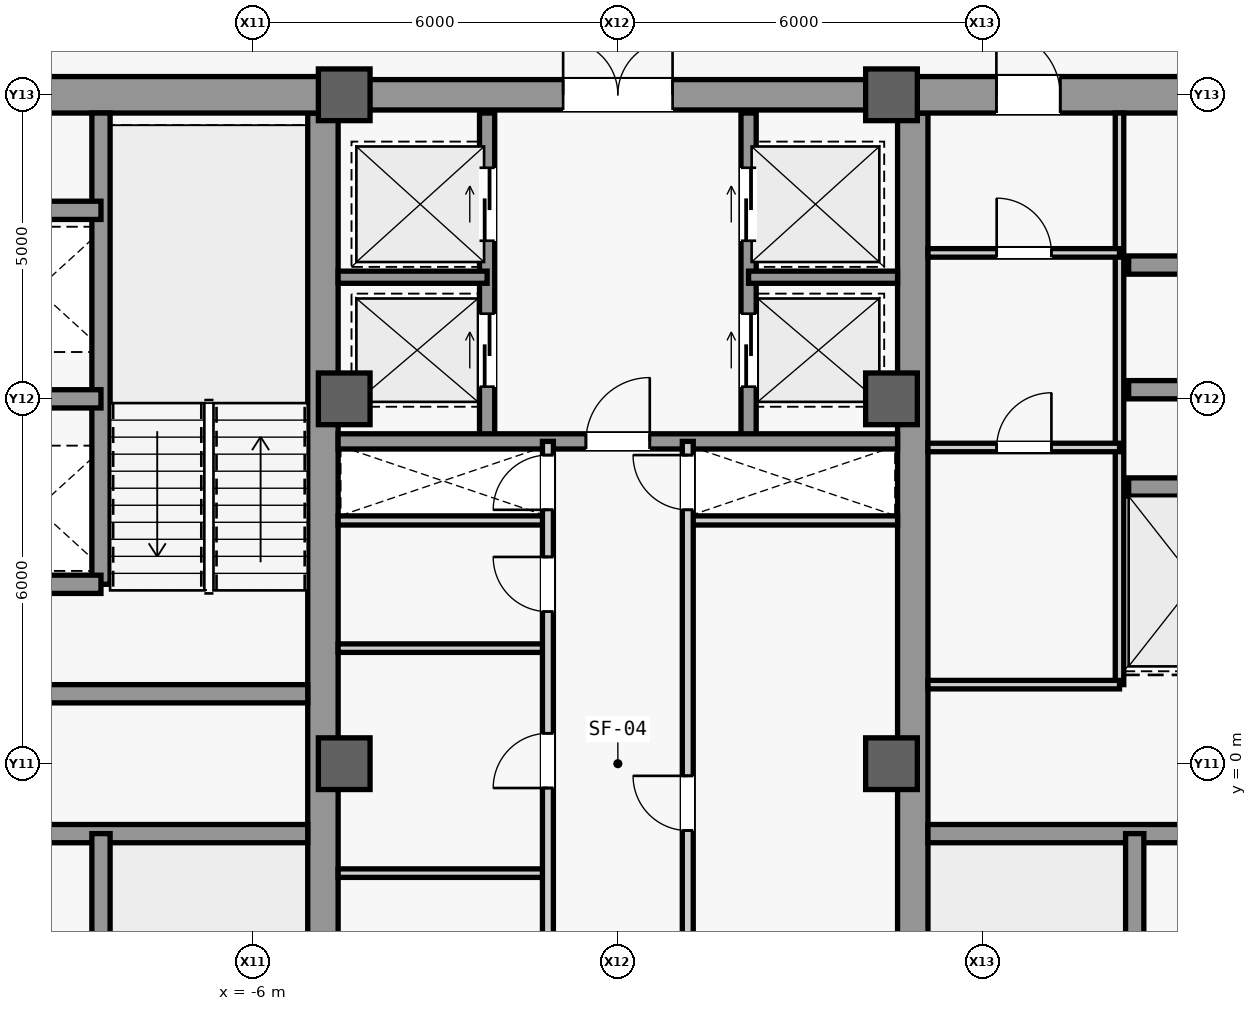
"""IFC4 building model, lengths in metres.
Left out: names, types, materials, properties, quantities, classifications, styles, units other than length and angle.
Written with IfcOpenShell. Run it as: python <this file> out.ifc"""

import sys

from ifc_helpers import new_model, si_unit, direction, frame, frame_2d, origin, origin_2d, place, context, subcontext, project, spatial, rectangle, extrude, source, transform, mapped, element, fill, save


model = new_model("IFC4")
c1 = context("Model", 3, precision=1e-05, world=origin(), true_north=direction((0.0, 1.0)))
c2 = subcontext(c1, "Body", "Model", "MODEL_VIEW")
j1 = project(units=[si_unit("LENGTHUNIT", "METRE"), si_unit("PLANEANGLEUNIT", "RADIAN")], contexts=[c1])
p1 = place(None, origin())
s1 = spatial("IfcSite", under=j1, at=p1, CompositionType="ELEMENT")
p2 = place(p1, origin())
s2 = spatial("IfcBuilding", under=s1, at=p2, CompositionType="ELEMENT")
p3 = place(p2, frame((0.0, 0.0, 211.1)))
s3 = spatial("IfcBuildingStorey", under=s2, at=p3, CompositionType="ELEMENT", Elevation=211.1)
m1 = source(origin(), c2, "Body", "SweptSolid", [
    extrude(rectangle(XDim=21.4, YDim=0.5, at=frame_2d((10.7, 0.0))), origin(), (0.0, 0.0, 1.0), 3.78),
])
for number, where, z_axis, x_axis in (
    (1, (-4.85, -10.7, 0.0), (0.0, 0.0, 1.0), (0.0, 1.0, 0.0)),
    (2, (4.85, -10.7, 0.0), (0.0, 0.0, 1.0), (0.0, 1.0, 0.0)),
):
    element("IfcWall", number, at=place(p3, frame(where, z_axis=z_axis, x_axis=x_axis)), inside=s3, PredefinedType="SHEAR", context=c2, shape_type="MappedRepresentation", body=[
        mapped(m1, transform((0.0, 0.0, 0.0), scale=1.0)),
    ])
m2 = source(origin(), c2, "Body", "SweptSolid", [
    extrude(rectangle(XDim=5.9, YDim=0.6, at=frame_2d((2.95, 0.0))), origin(), (0.0, 0.0, 1.0), 3.78),
])
p4 = place(p3, frame((-10.75, 11.0, 0.0), z_axis=(0.0, 0.0, 1.0), x_axis=(1.0, 0.0, 0.0)))
e3 = element("IfcWall", 3, at=p4, inside=s3, PredefinedType="SHEAR", context=c2, shape_type="MappedRepresentation", body=[
    mapped(m2, transform((0.0, 0.0, 0.0), scale=1.0)),
])
p5 = place(p3, frame((4.85, 11.0, 0.0), z_axis=(0.0, 0.0, 1.0), x_axis=(1.0, 0.0, 0.0)))
e4 = element("IfcWall", 4, at=p5, inside=s3, PredefinedType="SHEAR", context=c2, shape_type="MappedRepresentation", body=[
    mapped(m2, transform((0.0, 0.0, 0.0), scale=1.0)),
])
m3 = source(origin(), c2, "Body", "SweptSolid", [
    extrude(rectangle(XDim=1.05, YDim=2.2, at=frame_2d((0.525, 1.1))), frame((0.0, 0.31, 0.0), z_axis=(0.0, -1.0, 0.0), x_axis=(1.0, 0.0, 0.0)), (0.0, 0.0, 1.0), 0.62),
])
p6 = place(p5, frame((1.375, 0.0, 0.0)))
e5 = element("IfcOpeningElement", 5, at=p6, cuts=e4, PredefinedType="OPENING", context=c2, shape_type="MappedRepresentation", body=[
    mapped(m3, transform((0.0, 0.0, 0.0), scale=1.0)),
])
m4 = source(origin(), c2, "Body", "SweptSolid", [
    extrude(rectangle(XDim=5.65, YDim=0.3, at=frame_2d((2.825, 0.0))), origin(), (0.0, 0.0, 1.0), 3.78),
])
for number, where, z_axis, x_axis in (
    (6, (-10.75, -1.15, 0.0), (0.0, 0.0, 1.0), (1.0, 0.0, 0.0)),
    (7, (-10.75, 1.15, 0.0), (0.0, 0.0, 1.0), (1.0, 0.0, 0.0)),
    (8, (5.1, -1.15, 0.0), (0.0, 0.0, 1.0), (1.0, 0.0, 0.0)),
):
    element("IfcWall", number, at=place(p3, frame(where, z_axis=z_axis, x_axis=x_axis)), inside=s3, PredefinedType="SHEAR", context=c2, shape_type="MappedRepresentation", body=[
        mapped(m4, transform((0.0, 0.0, 0.0), scale=1.0)),
    ])
m5 = source(origin(), c2, "Body", "SweptSolid", [
    extrude(rectangle(XDim=9.2, YDim=0.5, at=frame_2d((4.6, 0.0))), origin(), (0.0, 0.0, 1.0), 3.78),
])
p7 = place(p3, frame((-4.6, 11.0, 0.0), z_axis=(0.0, 0.0, 1.0), x_axis=(1.0, 0.0, 0.0)))
e9 = element("IfcWall", 9, at=p7, inside=s3, PredefinedType="SHEAR", context=c2, shape_type="MappedRepresentation", body=[
    mapped(m5, transform((0.0, 0.0, 0.0), scale=1.0)),
])
m6 = source(origin(), c2, "Body", "SweptSolid", [
    extrude(rectangle(XDim=1.8, YDim=2.25, at=frame_2d((0.9, 1.125))), frame((0.0, 0.26, 0.0), z_axis=(0.0, -1.0, 0.0), x_axis=(1.0, 0.0, 0.0)), (0.0, 0.0, 1.0), 0.52),
])
p8 = place(p7, frame((3.7, 0.0, 0.0)))
e10 = element("IfcOpeningElement", 10, at=p8, cuts=e9, PredefinedType="OPENING", context=c2, shape_type="MappedRepresentation", body=[
    mapped(m6, transform((0.0, 0.0, 0.0), scale=1.0)),
])
m7 = source(origin(), c2, "Body", "SweptSolid", [
    extrude(rectangle(XDim=0.85, YDim=0.85, at=origin_2d()), origin(), (0.0, 0.0, 1.0), 4.0),
])
for number, where, z_axis, x_axis in (
    (11, (-4.5, 0.0, 0.0), (0.0, 0.0, 1.0), (1.0, 0.0, 0.0)),
    (12, (-4.5, 6.0, 0.0), (0.0, 0.0, 1.0), (1.0, 0.0, 0.0)),
    (13, (-4.5, 11.0, 0.0), (0.0, 0.0, 1.0), (1.0, 0.0, 0.0)),
    (14, (4.5, 0.0, 0.0), (0.0, 0.0, 1.0), (1.0, 0.0, 0.0)),
    (15, (4.5, 6.0, 0.0), (0.0, 0.0, 1.0), (1.0, 0.0, 0.0)),
    (16, (4.5, 11.0, 0.0), (0.0, 0.0, 1.0), (1.0, 0.0, 0.0)),
):
    element("IfcColumn", number, at=place(p3, frame(where, z_axis=z_axis, x_axis=x_axis)), inside=s3, PredefinedType="COLUMN", context=c2, shape_type="MappedRepresentation", body=[
        mapped(m7, transform((0.0, 0.0, 0.0), scale=1.0)),
    ])
m8 = source(origin(), c2, "Body", "SweptSolid", [
    extrude(rectangle(XDim=7.8, YDim=0.3, at=frame_2d((3.9, 0.0))), origin(), (0.0, 0.0, 1.0), 3.78),
])
p9 = place(p3, frame((-8.5, -8.95, 0.0), z_axis=(0.0, 0.0, 1.0), x_axis=(0.0, 1.0, 0.0)))
e17 = element("IfcWall", 17, at=p9, inside=s3, PredefinedType="SHEAR", context=c2, shape_type="MappedRepresentation", body=[
    mapped(m8, transform((0.0, 0.0, 0.0), scale=1.0)),
])
m9 = source(origin(), c2, "Body", "SweptSolid", [
    extrude(rectangle(XDim=7.75, YDim=0.3, at=frame_2d((3.875, 0.0))), origin(), (0.0, 0.0, 1.0), 3.78),
])
p10 = place(p3, frame((-8.5, 2.95, 0.0), z_axis=(0.0, 0.0, 1.0), x_axis=(0.0, 1.0, 0.0)))
e18 = element("IfcWall", 18, at=p10, inside=s3, PredefinedType="SHEAR", context=c2, shape_type="MappedRepresentation", body=[
    mapped(m9, transform((0.0, 0.0, 0.0), scale=1.0)),
])
m10 = source(origin(), c2, "Body", "SweptSolid", [
    extrude(rectangle(XDim=2.2, YDim=0.3, at=frame_2d((1.1, 0.0))), origin(), (0.0, 0.0, 1.0), 3.78),
])
for number, where, z_axis, x_axis in (
    (19, (-10.7, 2.95, 0.0), (0.0, 0.0, 1.0), (1.0, 0.0, 0.0)),
    (20, (-10.7, 6.0, 0.0), (0.0, 0.0, 1.0), (1.0, 0.0, 0.0)),
    (21, (-10.7, 9.1, 0.0), (0.0, 0.0, 1.0), (1.0, 0.0, 0.0)),
):
    element("IfcWall", number, at=place(p3, frame(where, z_axis=z_axis, x_axis=x_axis)), inside=s3, PredefinedType="SHEAR", context=c2, shape_type="MappedRepresentation", body=[
        mapped(m10, transform((0.0, 0.0, 0.0), scale=1.0)),
    ])
p11 = place(p3, frame((8.5, -8.95, 0.0), z_axis=(0.0, 0.0, 1.0), x_axis=(0.0, 1.0, 0.0)))
e22 = element("IfcWall", 22, at=p11, inside=s3, PredefinedType="SHEAR", context=c2, shape_type="MappedRepresentation", body=[
    mapped(m8, transform((0.0, 0.0, 0.0), scale=1.0)),
])
m11 = source(origin(), c2, "Body", "SweptSolid", [
    extrude(rectangle(XDim=2.3, YDim=0.3, at=frame_2d((1.15, 0.0))), origin(), (0.0, 0.0, 1.0), 3.78),
])
for number, where, z_axis, x_axis in (
    (23, (8.4, 4.55, 0.0), (0.0, 0.0, 1.0), (1.0, 0.0, 0.0)),
    (24, (8.4, 6.15, 0.0), (0.0, 0.0, 1.0), (1.0, 0.0, 0.0)),
    (25, (8.4, 8.2, 0.0), (0.0, 0.0, 1.0), (1.0, 0.0, 0.0)),
):
    element("IfcWall", number, at=place(p3, frame(where, z_axis=z_axis, x_axis=x_axis)), inside=s3, PredefinedType="SHEAR", context=c2, shape_type="MappedRepresentation", body=[
        mapped(m11, transform((0.0, 0.0, 0.0), scale=1.0)),
    ])
m12 = source(origin(), c2, "Body", "SweptSolid", [
    extrude(rectangle(XDim=9.4, YDim=0.14, at=frame_2d((4.7, 0.0))), origin(), (0.0, 0.0, 1.0), 3.78),
])
p12 = place(p3, frame((8.25, 1.3, 0.0), z_axis=(0.0, 0.0, 1.0), x_axis=(0.0, 1.0, 0.0)))
e26 = element("IfcWall", 26, at=p12, inside=s3, PredefinedType="PARTITIONING", context=c2, shape_type="MappedRepresentation", body=[
    mapped(m12, transform((0.0, 0.0, 0.0), scale=1.0)),
])
m13 = source(origin(), c2, "Body", "SweptSolid", [
    extrude(rectangle(XDim=3.15, YDim=0.14, at=frame_2d((1.575, 0.0))), origin(), (0.0, 0.0, 1.0), 3.78),
])
p13 = place(p3, frame((5.1, 1.3, 0.0), z_axis=(0.0, 0.0, 1.0), x_axis=(1.0, 0.0, 0.0)))
e27 = element("IfcWall", 27, at=p13, inside=s3, PredefinedType="PARTITIONING", context=c2, shape_type="MappedRepresentation", body=[
    mapped(m13, transform((0.0, 0.0, 0.0), scale=1.0)),
])
p14 = place(p3, frame((5.1, 8.4, 0.0), z_axis=(0.0, 0.0, 1.0), x_axis=(1.0, 0.0, 0.0)))
e28 = element("IfcWall", 28, at=p14, inside=s3, PredefinedType="PARTITIONING", context=c2, shape_type="MappedRepresentation", body=[
    mapped(m13, transform((0.0, 0.0, 0.0), scale=1.0)),
])
m14 = source(origin(), c2, "Body", "SweptSolid", [
    extrude(rectangle(XDim=0.9, YDim=2.15, at=frame_2d((0.45, 1.075))), frame((0.0, 0.08, 0.0), z_axis=(0.0, -1.0, 0.0), x_axis=(1.0, 0.0, 0.0)), (0.0, 0.0, 1.0), 0.16),
])
p15 = place(p14, frame((1.13, 0.0, 0.0)))
e29 = element("IfcOpeningElement", 29, at=p15, cuts=e28, PredefinedType="OPENING", context=c2, shape_type="MappedRepresentation", body=[
    mapped(m14, transform((0.0, 0.0, 0.0), scale=1.0)),
])
p16 = place(p3, frame((5.1, 5.2, 0.0), z_axis=(0.0, 0.0, 1.0), x_axis=(1.0, 0.0, 0.0)))
e30 = element("IfcWall", 30, at=p16, inside=s3, PredefinedType="PARTITIONING", context=c2, shape_type="MappedRepresentation", body=[
    mapped(m13, transform((0.0, 0.0, 0.0), scale=1.0)),
])
p17 = place(p16, frame((1.13, 0.0, 0.0)))
e31 = element("IfcOpeningElement", 31, at=p17, cuts=e30, PredefinedType="OPENING", context=c2, shape_type="MappedRepresentation", body=[
    mapped(m14, transform((0.0, 0.0, 0.0), scale=1.0)),
])
m15 = source(origin(), c2, "Body", "SweptSolid", [
    extrude(rectangle(XDim=3.45, YDim=0.15, at=frame_2d((1.725, 0.0))), origin(), (0.0, 0.0, 1.0), 3.78),
])
for number, where, z_axis, x_axis in (
    (32, (-4.6, 4.0, 0.0), (0.0, 0.0, 1.0), (1.0, 0.0, 0.0)),
    (33, (1.15, 4.0, 0.0), (0.0, 0.0, 1.0), (1.0, 0.0, 0.0)),
):
    element("IfcWall", number, at=place(p3, frame(where, z_axis=z_axis, x_axis=x_axis)), inside=s3, PredefinedType="PARTITIONING", context=c2, shape_type="MappedRepresentation", body=[
        mapped(m15, transform((0.0, 0.0, 0.0), scale=1.0)),
    ])
m16 = source(origin(), c2, "Body", "SweptSolid", [
    extrude(rectangle(XDim=5.4, YDim=0.25, at=frame_2d((2.7, 0.0))), origin(), (0.0, 0.0, 1.0), 3.78),
])
p18 = place(p3, frame((-2.15, 5.3, 0.0), z_axis=(0.0, 0.0, 1.0), x_axis=(0.0, 1.0, 0.0)))
e34 = element("IfcWall", 34, at=p18, inside=s3, PredefinedType="SHEAR", context=c2, shape_type="MappedRepresentation", body=[
    mapped(m16, transform((0.0, 0.0, 0.0), scale=1.0)),
])
m17 = source(origin(), c2, "Body", "SweptSolid", [
    extrude(rectangle(XDim=1.2, YDim=2.3, at=frame_2d((0.6, 1.15))), frame((0.0, 0.135, 0.0), z_axis=(0.0, -1.0, 0.0), x_axis=(1.0, 0.0, 0.0)), (0.0, 0.0, 1.0), 0.27),
])
p19 = place(p18, frame((3.3, 0.0, 0.0)))
e35 = element("IfcOpeningElement", 35, at=p19, cuts=e34, PredefinedType="OPENING", context=c2, shape_type="MappedRepresentation", body=[
    mapped(m17, transform((0.0, 0.0, 0.0), scale=1.0)),
])
p20 = place(p18, frame((0.9, 0.0, 0.0)))
e36 = element("IfcOpeningElement", 36, at=p20, cuts=e34, PredefinedType="OPENING", context=c2, shape_type="MappedRepresentation", body=[
    mapped(m17, transform((0.0, 0.0, 0.0), scale=1.0)),
])
p21 = place(p3, frame((2.15, 5.3, 0.0), z_axis=(0.0, 0.0, 1.0), x_axis=(0.0, 1.0, 0.0)))
e37 = element("IfcWall", 37, at=p21, inside=s3, PredefinedType="SHEAR", context=c2, shape_type="MappedRepresentation", body=[
    mapped(m16, transform((0.0, 0.0, 0.0), scale=1.0)),
])
p22 = place(p21, frame((3.3, 0.0, 0.0)))
e38 = element("IfcOpeningElement", 38, at=p22, cuts=e37, PredefinedType="OPENING", context=c2, shape_type="MappedRepresentation", body=[
    mapped(m17, transform((0.0, 0.0, 0.0), scale=1.0)),
])
p23 = place(p21, frame((0.9, 0.0, 0.0)))
e39 = element("IfcOpeningElement", 39, at=p23, cuts=e37, PredefinedType="OPENING", context=c2, shape_type="MappedRepresentation", body=[
    mapped(m17, transform((0.0, 0.0, 0.0), scale=1.0)),
])
m18 = source(origin(), c2, "Body", "SweptSolid", [
    extrude(rectangle(XDim=2.45, YDim=0.2, at=frame_2d((1.225, 0.0))), origin(), (0.0, 0.0, 1.0), 3.78),
])
for number, where, z_axis, x_axis in (
    (40, (-4.6, 8.0, 0.0), (0.0, 0.0, 1.0), (1.0, 0.0, 0.0)),
    (41, (2.15, 8.0, 0.0), (0.0, 0.0, 1.0), (1.0, 0.0, 0.0)),
):
    element("IfcWall", number, at=place(p3, frame(where, z_axis=z_axis, x_axis=x_axis)), inside=s3, PredefinedType="SHEAR", context=c2, shape_type="MappedRepresentation", body=[
        mapped(m18, transform((0.0, 0.0, 0.0), scale=1.0)),
    ])
m19 = source(origin(), c2, "Body", "SweptSolid", [
    extrude(rectangle(XDim=9.2, YDim=0.25, at=frame_2d((4.6, 0.0))), origin(), (0.0, 0.0, 1.0), 3.78),
])
p24 = place(p3, frame((-4.6, 5.3, 0.0), z_axis=(0.0, 0.0, 1.0), x_axis=(1.0, 0.0, 0.0)))
e42 = element("IfcWall", 42, at=p24, inside=s3, PredefinedType="SHEAR", context=c2, shape_type="MappedRepresentation", body=[
    mapped(m19, transform((0.0, 0.0, 0.0), scale=1.0)),
])
m20 = source(origin(), c2, "Body", "SweptSolid", [
    extrude(rectangle(XDim=1.05, YDim=2.2, at=frame_2d((0.525, 1.1))), frame((0.0, 0.135, 0.0), z_axis=(0.0, -1.0, 0.0), x_axis=(1.0, 0.0, 0.0)), (0.0, 0.0, 1.0), 0.27),
])
p25 = place(p24, frame((4.075, 0.0, 0.0)))
e43 = element("IfcOpeningElement", 43, at=p25, cuts=e42, PredefinedType="OPENING", context=c2, shape_type="MappedRepresentation", body=[
    mapped(m20, transform((0.0, 0.0, 0.0), scale=1.0)),
])
m21 = source(origin(), c2, "Body", "SweptSolid", [
    extrude(rectangle(XDim=3.45, YDim=0.14, at=frame_2d((1.725, 0.0))), origin(), (0.0, 0.0, 1.0), 3.78),
])
for number, where, z_axis, x_axis in (
    (44, (-4.6, -1.8, 0.0), (0.0, 0.0, 1.0), (1.0, 0.0, 0.0)),
    (45, (-4.6, 1.9, 0.0), (0.0, 0.0, 1.0), (1.0, 0.0, 0.0)),
):
    element("IfcWall", number, at=place(p3, frame(where, z_axis=z_axis, x_axis=x_axis)), inside=s3, PredefinedType="PARTITIONING", context=c2, shape_type="MappedRepresentation", body=[
        mapped(m21, transform((0.0, 0.0, 0.0), scale=1.0)),
    ])
m22 = source(origin(), c2, "Body", "SweptSolid", [
    extrude(rectangle(XDim=10.6, YDim=0.18, at=frame_2d((5.3, 0.0))), origin(), (0.0, 0.0, 1.0), 3.78),
])
p26 = place(p3, frame((-1.15, -5.3, 0.0), z_axis=(0.0, 0.0, 1.0), x_axis=(0.0, 1.0, 0.0)))
e46 = element("IfcWall", 46, at=p26, inside=s3, PredefinedType="PARTITIONING", context=c2, shape_type="MappedRepresentation", body=[
    mapped(m22, transform((0.0, 0.0, 0.0), scale=1.0)),
])
m23 = source(origin(), c2, "Body", "SweptSolid", [
    extrude(rectangle(XDim=0.9, YDim=2.15, at=frame_2d((0.45, 1.075))), frame((0.0, 0.1, 0.0), z_axis=(0.0, -1.0, 0.0), x_axis=(1.0, 0.0, 0.0)), (0.0, 0.0, 1.0), 0.2),
])
p27 = place(p26, frame((1.3, 0.0, 0.0)))
e47 = element("IfcOpeningElement", 47, at=p27, cuts=e46, PredefinedType="OPENING", context=c2, shape_type="MappedRepresentation", body=[
    mapped(m23, transform((0.0, 0.0, 0.0), scale=1.0)),
])
p28 = place(p26, frame((4.9, 0.0, 0.0)))
e48 = element("IfcOpeningElement", 48, at=p28, cuts=e46, PredefinedType="OPENING", context=c2, shape_type="MappedRepresentation", body=[
    mapped(m23, transform((0.0, 0.0, 0.0), scale=1.0)),
])
p29 = place(p26, frame((7.8, 0.0, 0.0)))
e49 = element("IfcOpeningElement", 49, at=p29, cuts=e46, PredefinedType="OPENING", context=c2, shape_type="MappedRepresentation", body=[
    mapped(m23, transform((0.0, 0.0, 0.0), scale=1.0)),
])
p30 = place(p26, frame((9.475, 0.0, 0.0)))
e50 = element("IfcOpeningElement", 50, at=p30, cuts=e46, PredefinedType="OPENING", context=c2, shape_type="MappedRepresentation", body=[
    mapped(m23, transform((0.0, 0.0, 0.0), scale=1.0)),
])
p31 = place(p3, frame((1.15, -5.3, 0.0), z_axis=(0.0, 0.0, 1.0), x_axis=(0.0, 1.0, 0.0)))
e51 = element("IfcWall", 51, at=p31, inside=s3, PredefinedType="PARTITIONING", context=c2, shape_type="MappedRepresentation", body=[
    mapped(m22, transform((0.0, 0.0, 0.0), scale=1.0)),
])
p32 = place(p31, frame((4.2, 0.0, 0.0)))
e52 = element("IfcOpeningElement", 52, at=p32, cuts=e51, PredefinedType="OPENING", context=c2, shape_type="MappedRepresentation", body=[
    mapped(m23, transform((0.0, 0.0, 0.0), scale=1.0)),
])
p33 = place(p31, frame((9.475, 0.0, 0.0)))
e53 = element("IfcOpeningElement", 53, at=p33, cuts=e51, PredefinedType="OPENING", context=c2, shape_type="MappedRepresentation", body=[
    mapped(m23, transform((0.0, 0.0, 0.0), scale=1.0)),
])
m24 = source(origin(), c2, "Body", "SweptSolid", [
    extrude(rectangle(XDim=1.05, YDim=2.2, at=frame_2d((0.525, 1.1))), frame((0.0, 0.025, 0.0), z_axis=(0.0, -1.0, 0.0), x_axis=(1.0, 0.0, 0.0)), (0.0, 0.0, 1.0), 0.05),
])
p34 = place(p6, origin())
e54 = element("IfcDoor", 54, at=p34, inside=s3, OperationType="SINGLE_SWING_LEFT", PredefinedType="DOOR", context=c2, shape_type="MappedRepresentation", body=[
    mapped(m24, transform((0.0, 0.0, 0.0), scale=1.0)),
])
fill(e5, e54)
m25 = source(origin(), c2, "Body", "SweptSolid", [
    extrude(rectangle(XDim=0.9, YDim=2.15, at=frame_2d((0.45, 1.075))), frame((0.0, 0.025, 0.0), z_axis=(0.0, -1.0, 0.0), x_axis=(1.0, 0.0, 0.0)), (0.0, 0.0, 1.0), 0.05),
])
p35 = place(p15, origin())
e55 = element("IfcDoor", 55, at=p35, inside=s3, OperationType="SINGLE_SWING_LEFT", PredefinedType="DOOR", context=c2, shape_type="MappedRepresentation", body=[
    mapped(m25, transform((0.0, 0.0, 0.0), scale=1.0)),
])
fill(e29, e55)
p36 = place(p17, origin())
e56 = element("IfcDoor", 56, at=p36, inside=s3, OperationType="SINGLE_SWING_RIGHT", PredefinedType="DOOR", context=c2, shape_type="MappedRepresentation", body=[
    mapped(m25, transform((0.0, 0.0, 0.0), scale=1.0)),
])
fill(e31, e56)
p37 = place(p25, origin())
e57 = element("IfcDoor", 57, at=p37, inside=s3, OperationType="SINGLE_SWING_RIGHT", PredefinedType="DOOR", context=c2, shape_type="MappedRepresentation", body=[
    mapped(m24, transform((0.0, 0.0, 0.0), scale=1.0)),
])
fill(e43, e57)
m26 = source(origin(), c2, "Body", "SweptSolid", [
    extrude(rectangle(XDim=1.8, YDim=2.25, at=frame_2d((0.9, 1.125))), frame((0.0, 0.025, 0.0), z_axis=(0.0, -1.0, 0.0), x_axis=(1.0, 0.0, 0.0)), (0.0, 0.0, 1.0), 0.05),
])
p38 = place(p8, origin())
e58 = element("IfcDoor", 58, at=p38, inside=s3, OperationType="SINGLE_SWING_RIGHT", PredefinedType="DOOR", context=c2, shape_type="MappedRepresentation", body=[
    mapped(m26, transform((0.0, 0.0, 0.0), scale=1.0)),
])
fill(e10, e58)
p39 = place(p28, origin())
e59 = element("IfcDoor", 59, at=p39, inside=s3, OperationType="SINGLE_SWING_LEFT", PredefinedType="DOOR", context=c2, shape_type="MappedRepresentation", body=[
    mapped(m25, transform((0.0, 0.0, 0.0), scale=1.0)),
])
fill(e48, e59)
p40 = place(p29, origin())
e60 = element("IfcDoor", 60, at=p40, inside=s3, OperationType="SINGLE_SWING_RIGHT", PredefinedType="DOOR", context=c2, shape_type="MappedRepresentation", body=[
    mapped(m25, transform((0.0, 0.0, 0.0), scale=1.0)),
])
fill(e49, e60)
p41 = place(p32, origin())
e61 = element("IfcDoor", 61, at=p41, inside=s3, OperationType="SINGLE_SWING_RIGHT", PredefinedType="DOOR", context=c2, shape_type="MappedRepresentation", body=[
    mapped(m25, transform((0.0, 0.0, 0.0), scale=1.0)),
])
fill(e52, e61)
p42 = place(p30, origin())
e62 = element("IfcDoor", 62, at=p42, inside=s3, OperationType="SINGLE_SWING_LEFT", PredefinedType="DOOR", context=c2, shape_type="MappedRepresentation", body=[
    mapped(m25, transform((0.0, 0.0, 0.0), scale=1.0)),
])
fill(e50, e62)
p43 = place(p33, origin())
e63 = element("IfcDoor", 63, at=p43, inside=s3, OperationType="SINGLE_SWING_RIGHT", PredefinedType="DOOR", context=c2, shape_type="MappedRepresentation", body=[
    mapped(m25, transform((0.0, 0.0, 0.0), scale=1.0)),
])
fill(e53, e63)
m27 = source(origin(), c2, "Body", "SweptSolid", [
    extrude(rectangle(XDim=1.2, YDim=2.3, at=frame_2d((0.6, 1.15))), frame((0.0, 0.025, 0.0), z_axis=(0.0, -1.0, 0.0), x_axis=(1.0, 0.0, 0.0)), (0.0, 0.0, 1.0), 0.05),
])
p44 = place(p19, origin())
e64 = element("IfcDoor", 64, at=p44, inside=s3, OperationType="SLIDING_TO_LEFT", PredefinedType="DOOR", context=c2, shape_type="MappedRepresentation", body=[
    mapped(m27, transform((0.0, 0.0, 0.0), scale=1.0)),
])
fill(e35, e64)
p45 = place(p22, origin())
e65 = element("IfcDoor", 65, at=p45, inside=s3, OperationType="SLIDING_TO_LEFT", PredefinedType="DOOR", context=c2, shape_type="MappedRepresentation", body=[
    mapped(m27, transform((0.0, 0.0, 0.0), scale=1.0)),
])
fill(e38, e65)
p46 = place(p20, origin())
e66 = element("IfcDoor", 66, at=p46, inside=s3, OperationType="SLIDING_TO_LEFT", PredefinedType="DOOR", context=c2, shape_type="MappedRepresentation", body=[
    mapped(m27, transform((0.0, 0.0, 0.0), scale=1.0)),
])
fill(e36, e66)
p47 = place(p23, origin())
e67 = element("IfcDoor", 67, at=p47, inside=s3, OperationType="SLIDING_TO_LEFT", PredefinedType="DOOR", context=c2, shape_type="MappedRepresentation", body=[
    mapped(m27, transform((0.0, 0.0, 0.0), scale=1.0)),
])
fill(e39, e67)
save(model, sys.argv[1])
